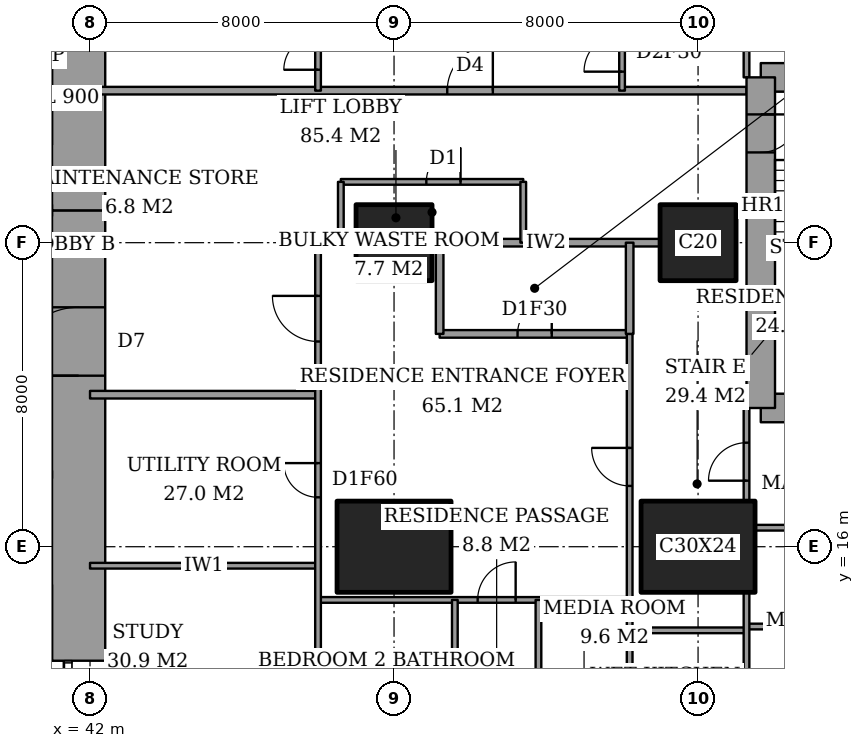
"""IFC4 building model, lengths in metres.
Left out: names, types, materials, properties, quantities, classifications, styles, units other than length and angle.
Written with IfcOpenShell. Run it as: python <this file> out.ifc"""

import sys

from ifc_helpers import new_model, si_unit, direction, frame, frame_2d, origin, origin_2d, place, context, subcontext, project, spatial, rectangle, extrude, element, fill, save


model = new_model("IFC4")
c1 = context("Model", 3, precision=1e-05, world=origin(), true_north=direction((0.0, 1.0)))
c2 = subcontext(c1, "Body", "Model", "MODEL_VIEW")
j1 = project(units=[si_unit("LENGTHUNIT", "METRE"), si_unit("PLANEANGLEUNIT", "RADIAN")], contexts=[c1])
p1 = place(None, origin())
s1 = spatial("IfcSite", under=j1, at=p1, CompositionType="ELEMENT")
p2 = place(p1, origin())
s2 = spatial("IfcBuilding", under=s1, at=p2, CompositionType="ELEMENT")
p3 = place(p2, frame((0.0, 0.0, 107.0)))
s3 = spatial("IfcBuildingStorey", under=s2, at=p3, CompositionType="ELEMENT", Elevation=107.0)
p4 = place(p3, frame((50.0, 16.0, 0.0), z_axis=(0.0, 0.0, 1.0), x_axis=(1.0, 0.0, 0.0)))
e1 = element("IfcColumn", 1, at=p4, inside=s3, PredefinedType="COLUMN", context=c2, shape_type="SweptSolid", body=[
    extrude(rectangle(XDim=3.0, YDim=2.4, at=origin_2d()), origin(), (0.0, 0.0, 1.0), 3.6),
])
p5 = place(p3, frame((50.0, 24.0, 0.0), z_axis=(0.0, 0.0, 1.0), x_axis=(1.0, 0.0, 0.0)))
e2 = element("IfcColumn", 2, at=p5, inside=s3, PredefinedType="COLUMN", context=c2, shape_type="SweptSolid", body=[
    extrude(rectangle(XDim=2.0, YDim=2.0, at=origin_2d()), origin(), (0.0, 0.0, 1.0), 3.6),
])
p6 = place(p3, frame((58.0, 16.0, 0.0), z_axis=(0.0, 0.0, 1.0), x_axis=(1.0, 0.0, 0.0)))
e3 = element("IfcColumn", 3, at=p6, inside=s3, PredefinedType="COLUMN", context=c2, shape_type="SweptSolid", body=[
    extrude(rectangle(XDim=3.0, YDim=2.4, at=origin_2d()), origin(), (0.0, 0.0, 1.0), 3.6),
])
p7 = place(p3, frame((58.0, 24.0, 0.0), z_axis=(0.0, 0.0, 1.0), x_axis=(1.0, 0.0, 0.0)))
e4 = element("IfcColumn", 4, at=p7, inside=s3, PredefinedType="COLUMN", context=c2, shape_type="SweptSolid", body=[
    extrude(rectangle(XDim=2.0, YDim=2.0, at=origin_2d()), origin(), (0.0, 0.0, 1.0), 3.6),
])
p8 = place(p3, frame((41.7, 13.0, 0.0), z_axis=(0.0, 0.0, 1.0), x_axis=(0.0, 1.0, 0.0)))
e5 = element("IfcWall", 5, at=p8, inside=s3, PredefinedType="SHEAR", context=c2, shape_type="SweptSolid", body=[
    extrude(rectangle(XDim=11.85, YDim=1.4, at=frame_2d((5.925, 0.0))), origin(), (0.0, 0.0, 1.0), 3.6),
])
p9 = place(p8, frame((7.5, 0.0, 0.0)))
e6 = element("IfcOpeningElement", 6, at=p9, cuts=e5, PredefinedType="OPENING", context=c2, shape_type="SweptSolid", body=[
    extrude(rectangle(XDim=1.8, YDim=2.4, at=frame_2d((0.9, 1.2))), frame((0.0, 0.71, 0.0), z_axis=(0.0, -1.0, 0.0), x_axis=(1.0, 0.0, 0.0)), (0.0, 0.0, 1.0), 1.42),
])
p10 = place(p3, frame((41.7, 24.85, 0.0), z_axis=(0.0, 0.0, 1.0), x_axis=(0.0, 1.0, 0.0)))
e7 = element("IfcWall", 7, at=p10, inside=s3, PredefinedType="SHEAR", context=c2, shape_type="SweptSolid", body=[
    extrude(rectangle(XDim=10.15, YDim=1.4, at=frame_2d((5.075, 0.0))), origin(), (0.0, 0.0, 1.0), 3.6),
])
for number, where, z_axis, x_axis in (
    (8, (59.65, 19.65, 0.0), (0.0, 0.0, 1.0), (1.0, 0.0, 0.0)),
    (9, (64.1, 28.35, 0.0), (0.0, 0.0, 1.0), (-1.0, 0.0, 0.0)),
):
    element("IfcWall", number, at=place(p3, frame(where, z_axis=z_axis, x_axis=x_axis)), inside=s3, PredefinedType="SHEAR", context=c2, shape_type="SweptSolid", body=[
        extrude(rectangle(XDim=4.45, YDim=0.75, at=frame_2d((2.225, 0.0))), origin(), (0.0, 0.0, 1.0), 3.6),
    ])
p11 = place(p3, frame((59.65, 28.35, 0.0), z_axis=(0.0, 0.0, 1.0), x_axis=(0.0, -1.0, 0.0)))
e10 = element("IfcWall", 10, at=p11, inside=s3, PredefinedType="SHEAR", context=c2, shape_type="SweptSolid", body=[
    extrude(rectangle(XDim=8.7, YDim=0.75, at=frame_2d((4.35, 0.0))), origin(), (0.0, 0.0, 1.0), 3.6),
])
p12 = place(p11, frame((0.975, 0.0, 0.0)))
e11 = element("IfcOpeningElement", 11, at=p12, cuts=e10, PredefinedType="OPENING", context=c2, shape_type="SweptSolid", body=[
    extrude(rectangle(XDim=1.0, YDim=2.1, at=frame_2d((0.5, 1.05))), frame((0.0, 0.385, 0.0), z_axis=(0.0, -1.0, 0.0), x_axis=(1.0, 0.0, 0.0)), (0.0, 0.0, 1.0), 0.77),
])
p13 = place(p3, frame((56.2, 13.8, 0.0), z_axis=(0.0, 0.0, 1.0), x_axis=(1.0, 0.0, 0.0)))
e12 = element("IfcWall", 12, at=p13, inside=s3, PredefinedType="PARTITIONING", context=c2, shape_type="SweptSolid", body=[
    extrude(rectangle(XDim=3.075, YDim=0.15, at=frame_2d((1.538, 0.0))), origin(), (0.0, 0.0, 1.0), 3.35),
])
p14 = place(p3, frame((59.275, 13.9, 0.0), z_axis=(0.0, 0.0, 1.0), x_axis=(1.0, 0.0, 0.0)))
e13 = element("IfcWall", 13, at=p14, inside=s3, PredefinedType="PARTITIONING", context=c2, shape_type="SweptSolid", body=[
    extrude(rectangle(XDim=2.4, YDim=0.15, at=frame_2d((1.2, 0.0))), origin(), (0.0, 0.0, 1.0), 3.35),
])
p15 = place(p3, frame((48.0, 14.6, 0.0), z_axis=(0.0, 0.0, 1.0), x_axis=(1.0, 0.0, 0.0)))
e14 = element("IfcWall", 14, at=p15, inside=s3, PredefinedType="PARTITIONING", context=c2, shape_type="SweptSolid", body=[
    extrude(rectangle(XDim=8.2, YDim=0.15, at=frame_2d((4.1, 0.0))), origin(), (0.0, 0.0, 1.0), 3.35),
])
p16 = place(p15, frame((4.2, 0.0, 0.0)))
e15 = element("IfcOpeningElement", 15, at=p16, cuts=e14, PredefinedType="OPENING", context=c2, shape_type="SweptSolid", body=[
    extrude(rectangle(XDim=1.0, YDim=2.1, at=frame_2d((0.5, 1.05))), frame((0.0, 0.085, 0.0), z_axis=(0.0, -1.0, 0.0), x_axis=(1.0, 0.0, 0.0)), (0.0, 0.0, 1.0), 0.17),
])
p17 = place(p3, frame((42.0, 15.5, 0.0), z_axis=(0.0, 0.0, 1.0), x_axis=(1.0, 0.0, 0.0)))
e16 = element("IfcWall", 16, at=p17, inside=s3, PredefinedType="PARTITIONING", context=c2, shape_type="SweptSolid", body=[
    extrude(rectangle(XDim=6.0, YDim=0.15, at=frame_2d((3.0, 0.0))), origin(), (0.0, 0.0, 1.0), 3.35),
])
p18 = place(p3, frame((59.5, 16.5, 0.0), z_axis=(0.0, 0.0, 1.0), x_axis=(1.0, 0.0, 0.0)))
e17 = element("IfcWall", 17, at=p18, inside=s3, PredefinedType="PARTITIONING", context=c2, shape_type="SweptSolid", body=[
    extrude(rectangle(XDim=5.15, YDim=0.15, at=frame_2d((2.575, 0.0))), origin(), (0.0, 0.0, 1.0), 3.35),
])
p19 = place(p3, frame((42.0, 20.0, 0.0), z_axis=(0.0, 0.0, 1.0), x_axis=(1.0, 0.0, 0.0)))
e18 = element("IfcWall", 18, at=p19, inside=s3, PredefinedType="PARTITIONING", context=c2, shape_type="SweptSolid", body=[
    extrude(rectangle(XDim=6.0, YDim=0.2, at=frame_2d((3.0, 0.0))), origin(), (0.0, 0.0, 1.0), 3.35),
])
p20 = place(p3, frame((51.2, 21.6, 0.0), z_axis=(0.0, 0.0, 1.0), x_axis=(1.0, 0.0, 0.0)))
e19 = element("IfcWall", 19, at=p20, inside=s3, PredefinedType="PARTITIONING", context=c2, shape_type="SweptSolid", body=[
    extrude(rectangle(XDim=5.0, YDim=0.2, at=frame_2d((2.5, 0.0))), origin(), (0.0, 0.0, 1.0), 3.35),
])
p21 = place(p20, frame((2.05, 0.0, 0.0)))
e20 = element("IfcOpeningElement", 20, at=p21, cuts=e19, PredefinedType="OPENING", context=c2, shape_type="SweptSolid", body=[
    extrude(rectangle(XDim=0.9, YDim=2.1, at=frame_2d((0.45, 1.05))), frame((0.0, 0.11, 0.0), z_axis=(0.0, -1.0, 0.0), x_axis=(1.0, 0.0, 0.0)), (0.0, 0.0, 1.0), 0.22),
])
p22 = place(p3, frame((48.0, 24.0, 0.0), z_axis=(0.0, 0.0, 1.0), x_axis=(1.0, 0.0, 0.0)))
e21 = element("IfcWall", 21, at=p22, inside=s3, PredefinedType="PARTITIONING", context=c2, shape_type="SweptSolid", body=[
    extrude(rectangle(XDim=1.0, YDim=0.2, at=frame_2d((0.5, 0.0))), origin(), (0.0, 0.0, 1.0), 3.35),
])
p23 = place(p3, frame((51.0, 24.0, 0.0), z_axis=(0.0, 0.0, 1.0), x_axis=(1.0, 0.0, 0.0)))
e22 = element("IfcWall", 22, at=p23, inside=s3, PredefinedType="PARTITIONING", context=c2, shape_type="SweptSolid", body=[
    extrude(rectangle(XDim=6.0, YDim=0.2, at=frame_2d((3.0, 0.0))), origin(), (0.0, 0.0, 1.0), 3.35),
])
p24 = place(p3, frame((48.6, 25.6, 0.0), z_axis=(0.0, 0.0, 1.0), x_axis=(1.0, 0.0, 0.0)))
e23 = element("IfcWall", 23, at=p24, inside=s3, PredefinedType="PARTITIONING", context=c2, shape_type="SweptSolid", body=[
    extrude(rectangle(XDim=4.8, YDim=0.15, at=frame_2d((2.4, 0.0))), origin(), (0.0, 0.0, 1.0), 3.35),
])
p25 = place(p24, frame((2.25, 0.0, 0.0)))
e24 = element("IfcOpeningElement", 24, at=p25, cuts=e23, PredefinedType="OPENING", context=c2, shape_type="SweptSolid", body=[
    extrude(rectangle(XDim=0.9, YDim=2.1, at=frame_2d((0.45, 1.05))), frame((0.0, 0.085, 0.0), z_axis=(0.0, -1.0, 0.0), x_axis=(1.0, 0.0, 0.0)), (0.0, 0.0, 1.0), 0.17),
])
p26 = place(p3, frame((42.0, 28.0, 0.0), z_axis=(0.0, 0.0, 1.0), x_axis=(1.0, 0.0, 0.0)))
e25 = element("IfcWall", 25, at=p26, inside=s3, PredefinedType="PARTITIONING", context=c2, shape_type="SweptSolid", body=[
    extrude(rectangle(XDim=17.275, YDim=0.2, at=frame_2d((8.637, 0.0))), origin(), (0.0, 0.0, 1.0), 3.35),
])
p27 = place(p26, frame((9.4, 0.0, 0.0)))
e26 = element("IfcOpeningElement", 26, at=p27, cuts=e25, PredefinedType="OPENING", context=c2, shape_type="SweptSolid", body=[
    extrude(rectangle(XDim=1.2, YDim=2.4, at=frame_2d((0.6, 1.2))), frame((0.0, 0.11, 0.0), z_axis=(0.0, -1.0, 0.0), x_axis=(1.0, 0.0, 0.0)), (0.0, 0.0, 1.0), 0.22),
])
p28 = place(p3, frame((48.0, 10.6, 0.0), z_axis=(0.0, 0.0, 1.0), x_axis=(0.0, 1.0, 0.0)))
e27 = element("IfcWall", 27, at=p28, inside=s3, PredefinedType="PARTITIONING", context=c2, shape_type="SweptSolid", body=[
    extrude(rectangle(XDim=13.4, YDim=0.15, at=frame_2d((6.7, 0.0))), origin(), (0.0, 0.0, 1.0), 3.35),
])
p29 = place(p28, frame((10.8, 0.0, 0.0)))
e28 = element("IfcOpeningElement", 28, at=p29, cuts=e27, PredefinedType="OPENING", context=c2, shape_type="SweptSolid", body=[
    extrude(rectangle(XDim=1.2, YDim=2.4, at=frame_2d((0.6, 1.2))), frame((0.0, 0.085, 0.0), z_axis=(0.0, -1.0, 0.0), x_axis=(1.0, 0.0, 0.0)), (0.0, 0.0, 1.0), 0.17),
])
p30 = place(p28, frame((6.7, 0.0, 0.0)))
e29 = element("IfcOpeningElement", 29, at=p30, cuts=e27, PredefinedType="OPENING", context=c2, shape_type="SweptSolid", body=[
    extrude(rectangle(XDim=0.9, YDim=2.1, at=frame_2d((0.45, 1.05))), frame((0.0, 0.085, 0.0), z_axis=(0.0, -1.0, 0.0), x_axis=(1.0, 0.0, 0.0)), (0.0, 0.0, 1.0), 0.17),
])
p31 = place(p3, frame((48.0, 28.0, 0.0), z_axis=(0.0, 0.0, 1.0), x_axis=(0.0, 1.0, 0.0)))
e30 = element("IfcWall", 30, at=p31, inside=s3, PredefinedType="PARTITIONING", context=c2, shape_type="SweptSolid", body=[
    extrude(rectangle(XDim=9.4, YDim=0.15, at=frame_2d((4.7, 0.0))), origin(), (0.0, 0.0, 1.0), 3.35),
])
p32 = place(p31, frame((0.55, 0.0, 0.0)))
e31 = element("IfcOpeningElement", 31, at=p32, cuts=e30, PredefinedType="OPENING", context=c2, shape_type="SweptSolid", body=[
    extrude(rectangle(XDim=0.9, YDim=2.1, at=frame_2d((0.45, 1.05))), frame((0.0, 0.085, 0.0), z_axis=(0.0, -1.0, 0.0), x_axis=(1.0, 0.0, 0.0)), (0.0, 0.0, 1.0), 0.17),
])
p33 = place(p3, frame((48.6, 24.0, 0.0), z_axis=(0.0, 0.0, 1.0), x_axis=(0.0, 1.0, 0.0)))
e32 = element("IfcWall", 32, at=p33, inside=s3, PredefinedType="PARTITIONING", context=c2, shape_type="SweptSolid", body=[
    extrude(rectangle(XDim=1.6, YDim=0.15, at=frame_2d((0.8, 0.0))), origin(), (0.0, 0.0, 1.0), 3.35),
])
p34 = place(p3, frame((51.2, 21.6, 0.0), z_axis=(0.0, 0.0, 1.0), x_axis=(0.0, 1.0, 0.0)))
e33 = element("IfcWall", 33, at=p34, inside=s3, PredefinedType="PARTITIONING", context=c2, shape_type="SweptSolid", body=[
    extrude(rectangle(XDim=2.4, YDim=0.2, at=frame_2d((1.2, 0.0))), origin(), (0.0, 0.0, 1.0), 3.35),
])
p35 = place(p3, frame((51.6, 10.6, 0.0), z_axis=(0.0, 0.0, 1.0), x_axis=(0.0, 1.0, 0.0)))
e34 = element("IfcWall", 34, at=p35, inside=s3, PredefinedType="PARTITIONING", context=c2, shape_type="SweptSolid", body=[
    extrude(rectangle(XDim=4.0, YDim=0.15, at=frame_2d((2.0, 0.0))), origin(), (0.0, 0.0, 1.0), 3.35),
])
p36 = place(p3, frame((53.4, 24.0, 0.0), z_axis=(0.0, 0.0, 1.0), x_axis=(0.0, 1.0, 0.0)))
e35 = element("IfcWall", 35, at=p36, inside=s3, PredefinedType="PARTITIONING", context=c2, shape_type="SweptSolid", body=[
    extrude(rectangle(XDim=1.6, YDim=0.15, at=frame_2d((0.8, 0.0))), origin(), (0.0, 0.0, 1.0), 3.35),
])
p37 = place(p3, frame((53.8, 10.6, 0.0), z_axis=(0.0, 0.0, 1.0), x_axis=(0.0, 1.0, 0.0)))
e36 = element("IfcWall", 36, at=p37, inside=s3, PredefinedType="PARTITIONING", context=c2, shape_type="SweptSolid", body=[
    extrude(rectangle(XDim=4.0, YDim=0.15, at=frame_2d((2.0, 0.0))), origin(), (0.0, 0.0, 1.0), 3.35),
])
p38 = place(p3, frame((56.0, 28.0, 0.0), z_axis=(0.0, 0.0, 1.0), x_axis=(0.0, 1.0, 0.0)))
e37 = element("IfcWall", 37, at=p38, inside=s3, PredefinedType="PARTITIONING", context=c2, shape_type="SweptSolid", body=[
    extrude(rectangle(XDim=9.4, YDim=0.15, at=frame_2d((4.7, 0.0))), origin(), (0.0, 0.0, 1.0), 3.35),
])
p39 = place(p38, frame((0.5, 0.0, 0.0)))
e38 = element("IfcOpeningElement", 38, at=p39, cuts=e37, PredefinedType="OPENING", context=c2, shape_type="SweptSolid", body=[
    extrude(rectangle(XDim=1.0, YDim=2.1, at=frame_2d((0.5, 1.05))), frame((0.0, 0.085, 0.0), z_axis=(0.0, -1.0, 0.0), x_axis=(1.0, 0.0, 0.0)), (0.0, 0.0, 1.0), 0.17),
])
p40 = place(p3, frame((56.2, 21.6, 0.0), z_axis=(0.0, 0.0, 1.0), x_axis=(0.0, 1.0, 0.0)))
e39 = element("IfcWall", 39, at=p40, inside=s3, PredefinedType="PARTITIONING", context=c2, shape_type="SweptSolid", body=[
    extrude(rectangle(XDim=2.4, YDim=0.2, at=frame_2d((1.2, 0.0))), origin(), (0.0, 0.0, 1.0), 3.35),
])
p41 = place(p3, frame((56.2, 10.6, 0.0), z_axis=(0.0, 0.0, 1.0), x_axis=(0.0, 1.0, 0.0)))
e40 = element("IfcWall", 40, at=p41, inside=s3, PredefinedType="PARTITIONING", context=c2, shape_type="SweptSolid", body=[
    extrude(rectangle(XDim=11.0, YDim=0.15, at=frame_2d((5.5, 0.0))), origin(), (0.0, 0.0, 1.0), 3.35),
])
p42 = place(p41, frame((7.0, 0.0, 0.0)))
e41 = element("IfcOpeningElement", 41, at=p42, cuts=e40, PredefinedType="OPENING", context=c2, shape_type="SweptSolid", body=[
    extrude(rectangle(XDim=1.0, YDim=2.1, at=frame_2d((0.5, 1.05))), frame((0.0, 0.085, 0.0), z_axis=(0.0, -1.0, 0.0), x_axis=(1.0, 0.0, 0.0)), (0.0, 0.0, 1.0), 0.17),
])
p43 = place(p3, frame((59.275, 10.6, 0.0), z_axis=(0.0, 0.0, 1.0), x_axis=(0.0, 1.0, 0.0)))
e42 = element("IfcWall", 42, at=p43, inside=s3, PredefinedType="PARTITIONING", context=c2, shape_type="SweptSolid", body=[
    extrude(rectangle(XDim=4.2, YDim=0.15, at=frame_2d((2.1, 0.0))), origin(), (0.0, 0.0, 1.0), 3.35),
])
p44 = place(p3, frame((59.275, 17.2, 0.0), z_axis=(0.0, 0.0, 1.0), x_axis=(0.0, 1.0, 0.0)))
e43 = element("IfcWall", 43, at=p44, inside=s3, PredefinedType="PARTITIONING", context=c2, shape_type="SweptSolid", body=[
    extrude(rectangle(XDim=2.45, YDim=0.15, at=frame_2d((1.225, 0.0))), origin(), (0.0, 0.0, 1.0), 3.35),
])
p45 = place(p44, frame((0.538, 0.0, 0.0)))
e44 = element("IfcOpeningElement", 44, at=p45, cuts=e43, PredefinedType="OPENING", context=c2, shape_type="SweptSolid", body=[
    extrude(rectangle(XDim=1.0, YDim=2.1, at=frame_2d((0.5, 1.05))), frame((0.0, 0.085, 0.0), z_axis=(0.0, -1.0, 0.0), x_axis=(1.0, 0.0, 0.0)), (0.0, 0.0, 1.0), 0.17),
])
p46 = place(p3, frame((59.275, 28.35, 0.0), z_axis=(0.0, 0.0, 1.0), x_axis=(0.0, 1.0, 0.0)))
e45 = element("IfcWall", 45, at=p46, inside=s3, PredefinedType="PARTITIONING", context=c2, shape_type="SweptSolid", body=[
    extrude(rectangle(XDim=2.45, YDim=0.15, at=frame_2d((1.225, 0.0))), origin(), (0.0, 0.0, 1.0), 3.35),
])
p47 = place(p46, frame((0.913, 0.0, 0.0)))
e46 = element("IfcOpeningElement", 46, at=p47, cuts=e45, PredefinedType="OPENING", context=c2, shape_type="SweptSolid", body=[
    extrude(rectangle(XDim=1.0, YDim=2.1, at=frame_2d((0.5, 1.05))), frame((0.0, 0.085, 0.0), z_axis=(0.0, -1.0, 0.0), x_axis=(1.0, 0.0, 0.0)), (0.0, 0.0, 1.0), 0.17),
])
p48 = place(p3, frame((28.3, 17.9, 0.0), z_axis=(0.0, 0.0, 1.0), x_axis=(1.0, 0.0, 0.0)))
e47 = element("IfcWall", 47, at=p48, inside=s3, PredefinedType="PARTITIONING", context=c2, shape_type="SweptSolid", body=[
    extrude(rectangle(XDim=12.7, YDim=0.2, at=frame_2d((6.35, 0.0))), origin(), (0.0, 0.0, 1.0), 3.6),
])
p49 = place(p48, frame((0.95, 0.0, 0.0)))
e48 = element("IfcOpeningElement", 48, at=p49, cuts=e47, PredefinedType="OPENING", context=c2, shape_type="SweptSolid", body=[
    extrude(rectangle(XDim=1.1, YDim=2.1, at=frame_2d((0.55, 1.05))), frame((0.0, 0.11, 0.0), z_axis=(0.0, -1.0, 0.0), x_axis=(1.0, 0.0, 0.0)), (0.0, 0.0, 1.0), 0.22),
])
p50 = place(p48, frame((4.15, 0.0, 0.0)))
e49 = element("IfcOpeningElement", 49, at=p50, cuts=e47, PredefinedType="OPENING", context=c2, shape_type="SweptSolid", body=[
    extrude(rectangle(XDim=1.1, YDim=2.1, at=frame_2d((0.55, 1.05))), frame((0.0, 0.11, 0.0), z_axis=(0.0, -1.0, 0.0), x_axis=(1.0, 0.0, 0.0)), (0.0, 0.0, 1.0), 0.22),
])
p51 = place(p48, frame((7.35, 0.0, 0.0)))
e50 = element("IfcOpeningElement", 50, at=p51, cuts=e47, PredefinedType="OPENING", context=c2, shape_type="SweptSolid", body=[
    extrude(rectangle(XDim=1.1, YDim=2.1, at=frame_2d((0.55, 1.05))), frame((0.0, 0.11, 0.0), z_axis=(0.0, -1.0, 0.0), x_axis=(1.0, 0.0, 0.0)), (0.0, 0.0, 1.0), 0.22),
])
p52 = place(p48, frame((10.6, 0.0, 0.0)))
e51 = element("IfcOpeningElement", 51, at=p52, cuts=e47, PredefinedType="OPENING", context=c2, shape_type="SweptSolid", body=[
    extrude(rectangle(XDim=1.2, YDim=2.1, at=frame_2d((0.6, 1.05))), frame((0.0, 0.11, 0.0), z_axis=(0.0, -1.0, 0.0), x_axis=(1.0, 0.0, 0.0)), (0.0, 0.0, 1.0), 0.22),
])
p53 = place(p45, origin())
e52 = element("IfcDoor", 52, at=p53, inside=s3, OperationType="SINGLE_SWING_RIGHT", PredefinedType="DOOR", context=c2, shape_type="SweptSolid", body=[
    extrude(rectangle(XDim=1.0, YDim=2.1, at=frame_2d((0.5, 1.05))), frame((0.0, 0.025, 0.0), z_axis=(0.0, -1.0, 0.0), x_axis=(1.0, 0.0, 0.0)), (0.0, 0.0, 1.0), 0.05),
])
fill(e44, e52)
p54 = place(p42, origin())
e53 = element("IfcDoor", 53, at=p54, inside=s3, OperationType="SINGLE_SWING_LEFT", PredefinedType="DOOR", context=c2, shape_type="SweptSolid", body=[
    extrude(rectangle(XDim=1.0, YDim=2.1, at=frame_2d((0.5, 1.05))), frame((0.0, 0.025, 0.0), z_axis=(0.0, -1.0, 0.0), x_axis=(1.0, 0.0, 0.0)), (0.0, 0.0, 1.0), 0.05),
])
fill(e41, e53)
p55 = place(p21, origin())
e54 = element("IfcDoor", 54, at=p55, inside=s3, OperationType="SINGLE_SWING_LEFT", PredefinedType="DOOR", context=c2, shape_type="SweptSolid", body=[
    extrude(rectangle(XDim=0.9, YDim=2.1, at=frame_2d((0.45, 1.05))), frame((0.0, 0.025, 0.0), z_axis=(0.0, -1.0, 0.0), x_axis=(1.0, 0.0, 0.0)), (0.0, 0.0, 1.0), 0.05),
])
fill(e20, e54)
p56 = place(p29, origin())
e55 = element("IfcDoor", 55, at=p56, inside=s3, OperationType="SINGLE_SWING_LEFT", PredefinedType="DOOR", context=c2, shape_type="SweptSolid", body=[
    extrude(rectangle(XDim=1.2, YDim=2.4, at=frame_2d((0.6, 1.2))), frame((0.0, 0.025, 0.0), z_axis=(0.0, -1.0, 0.0), x_axis=(1.0, 0.0, 0.0)), (0.0, 0.0, 1.0), 0.05),
])
fill(e28, e55)
p57 = place(p16, origin())
e56 = element("IfcDoor", 56, at=p57, inside=s3, OperationType="SINGLE_SWING_LEFT", PredefinedType="DOOR", context=c2, shape_type="SweptSolid", body=[
    extrude(rectangle(XDim=1.0, YDim=2.1, at=frame_2d((0.5, 1.05))), frame((0.0, 0.025, 0.0), z_axis=(0.0, -1.0, 0.0), x_axis=(1.0, 0.0, 0.0)), (0.0, 0.0, 1.0), 0.05),
])
fill(e15, e56)
p58 = place(p30, origin())
e57 = element("IfcDoor", 57, at=p58, inside=s3, OperationType="SINGLE_SWING_LEFT", PredefinedType="DOOR", context=c2, shape_type="SweptSolid", body=[
    extrude(rectangle(XDim=0.9, YDim=2.1, at=frame_2d((0.45, 1.05))), frame((0.0, 0.025, 0.0), z_axis=(0.0, -1.0, 0.0), x_axis=(1.0, 0.0, 0.0)), (0.0, 0.0, 1.0), 0.05),
])
fill(e29, e57)
p59 = place(p39, origin())
e58 = element("IfcDoor", 58, at=p59, inside=s3, OperationType="SINGLE_SWING_RIGHT", PredefinedType="DOOR", context=c2, shape_type="SweptSolid", body=[
    extrude(rectangle(XDim=1.0, YDim=2.1, at=frame_2d((0.5, 1.05))), frame((0.0, 0.025, 0.0), z_axis=(0.0, -1.0, 0.0), x_axis=(1.0, 0.0, 0.0)), (0.0, 0.0, 1.0), 0.05),
])
fill(e38, e58)
p60 = place(p27, origin())
e59 = element("IfcDoor", 59, at=p60, inside=s3, OperationType="SINGLE_SWING_LEFT", PredefinedType="DOOR", context=c2, shape_type="SweptSolid", body=[
    extrude(rectangle(XDim=1.2, YDim=2.4, at=frame_2d((0.6, 1.2))), frame((0.0, 0.025, 0.0), z_axis=(0.0, -1.0, 0.0), x_axis=(1.0, 0.0, 0.0)), (0.0, 0.0, 1.0), 0.05),
])
fill(e26, e59)
p61 = place(p32, origin())
e60 = element("IfcDoor", 60, at=p61, inside=s3, OperationType="SINGLE_SWING_RIGHT", PredefinedType="DOOR", context=c2, shape_type="SweptSolid", body=[
    extrude(rectangle(XDim=0.9, YDim=2.1, at=frame_2d((0.45, 1.05))), frame((0.0, 0.025, 0.0), z_axis=(0.0, -1.0, 0.0), x_axis=(1.0, 0.0, 0.0)), (0.0, 0.0, 1.0), 0.05),
])
fill(e31, e60)
p62 = place(p25, origin())
e61 = element("IfcDoor", 61, at=p62, inside=s3, OperationType="SINGLE_SWING_LEFT", PredefinedType="DOOR", context=c2, shape_type="SweptSolid", body=[
    extrude(rectangle(XDim=0.9, YDim=2.1, at=frame_2d((0.45, 1.05))), frame((0.0, 0.025, 0.0), z_axis=(0.0, -1.0, 0.0), x_axis=(1.0, 0.0, 0.0)), (0.0, 0.0, 1.0), 0.05),
])
fill(e24, e61)
p63 = place(p9, origin())
e62 = element("IfcDoor", 62, at=p63, inside=s3, OperationType="DOUBLE_DOOR_DOUBLE_SWING", PredefinedType="DOOR", context=c2, shape_type="SweptSolid", body=[
    extrude(rectangle(XDim=1.8, YDim=2.4, at=frame_2d((0.9, 1.2))), frame((0.0, 0.025, 0.0), z_axis=(0.0, -1.0, 0.0), x_axis=(1.0, 0.0, 0.0)), (0.0, 0.0, 1.0), 0.05),
])
fill(e6, e62)
p64 = place(p12, origin())
e63 = element("IfcDoor", 63, at=p64, inside=s3, OperationType="SINGLE_SWING_RIGHT", PredefinedType="DOOR", context=c2, shape_type="SweptSolid", body=[
    extrude(rectangle(XDim=1.0, YDim=2.1, at=frame_2d((0.5, 1.05))), frame((0.0, 0.025, 0.0), z_axis=(0.0, -1.0, 0.0), x_axis=(1.0, 0.0, 0.0)), (0.0, 0.0, 1.0), 0.05),
])
fill(e11, e63)
save(model, sys.argv[1])
